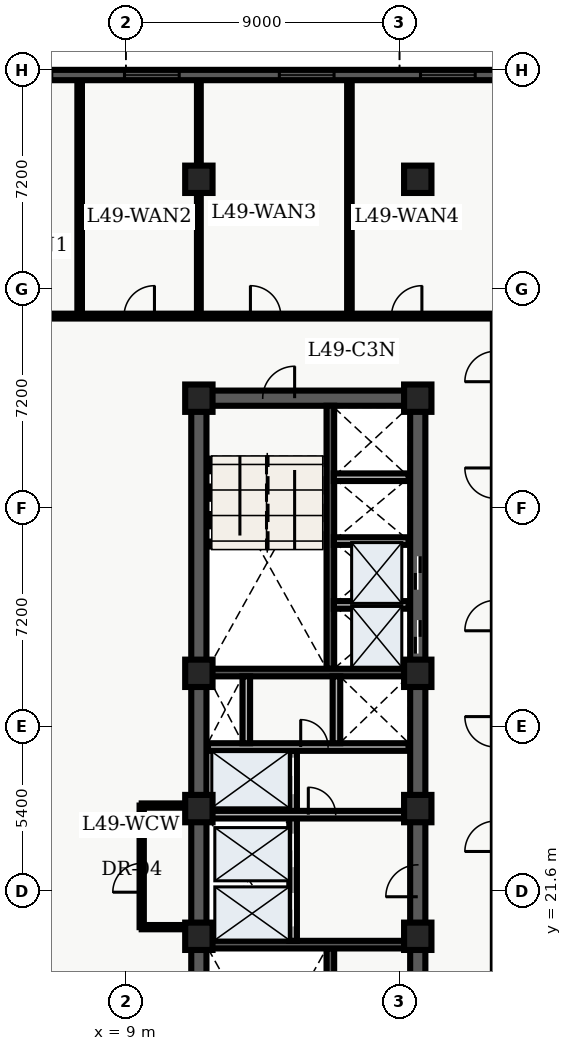
"""IFC4 building model, lengths in metres.
Left out: names, types, materials, properties, quantities, classifications, styles, units other than length and angle.
Written with IfcOpenShell. Run it as: python <this file> out.ifc"""

import sys

from ifc_helpers import new_model, entity, si_unit, converted_unit, direction, frame, origin_with_axes, origin_2d_with_axis, place, context, subcontext, project, spatial, polyline, rectangle, outline, extrude, element, fill, save


model = new_model("IFC4")
c1 = context("Model", 3, precision=1e-05, world=origin_with_axes(), true_north=direction((0.0, 1.0)))
c2 = subcontext(c1, "Body", "Model", "MODEL_VIEW")
j1 = project(units=[si_unit("LENGTHUNIT", "METRE"), converted_unit("PLANEANGLEUNIT", "DEGREE", entity("IfcPlaneAngleMeasure", 0.017), si_unit("PLANEANGLEUNIT", "RADIAN"), dimensions=[0, 0, 0, 0, 0, 0, 0])], contexts=[c1])
p1 = place(None, origin_with_axes())
s1 = spatial("IfcSite", under=j1, at=p1, CompositionType="ELEMENT")
p2 = place(p1, origin_with_axes())
s2 = spatial("IfcBuilding", under=s1, at=p2, CompositionType="ELEMENT")
p3 = place(p2, frame((0.0, 0.0, 200.4), z_axis=(0.0, 0.0, 1.0), x_axis=(1.0, 0.0, 0.0)))
s3 = spatial("IfcBuildingStorey", under=s2, at=p3, CompositionType="ELEMENT", Elevation=200.4)
p4 = place(p3, frame((11.4, 10.8, 0.0), z_axis=(0.0, 0.0, 1.0), x_axis=(0.0, 1.0, 0.0)))
e1 = element("IfcWall", 1, at=p4, inside=s3, PredefinedType="SHEAR", context=c2, shape_type="SweptSolid", body=[
    extrude(outline(polyline([(0.0, -0.25), (27.0, -0.25), (27.0, 0.25), (0.0, 0.25), (0.0, -0.25)])), origin_with_axes(), (0.0, 0.0, 1.0), 3.66),
])
p5 = place(p3, frame((11.4, 37.8, 0.0), z_axis=(0.0, 0.0, 1.0), x_axis=(1.0, 0.0, 0.0)))
e2 = element("IfcWall", 2, at=p5, inside=s3, PredefinedType="SHEAR", context=c2, shape_type="SweptSolid", body=[
    extrude(outline(polyline([(0.0, -0.25), (7.2, -0.25), (7.2, 0.25), (0.0, 0.25), (0.0, -0.25)])), origin_with_axes(), (0.0, 0.0, 1.0), 3.66),
])
p6 = place(p5, frame((2.625, 0.0, 0.0), z_axis=(0.0, 0.0, 1.0), x_axis=(1.0, 0.0, 0.0)))
e3 = element("IfcOpeningElement", 3, at=p6, cuts=e2, PredefinedType="OPENING", context=c2, shape_type="SweptSolid", body=[
    extrude(rectangle(XDim=1.05, YDim=0.52, at=origin_2d_with_axis()), origin_with_axes(), (0.0, 0.0, 1.0), 2.15),
])
p7 = place(p3, frame((18.6, 10.8, 0.0), z_axis=(0.0, 0.0, 1.0), x_axis=(0.0, 1.0, 0.0)))
e4 = element("IfcWall", 4, at=p7, inside=s3, PredefinedType="SHEAR", context=c2, shape_type="SweptSolid", body=[
    extrude(outline(polyline([(0.0, -0.25), (13.5, -0.25), (13.5, 0.25), (0.0, 0.25), (0.0, -0.25)])), origin_with_axes(), (0.0, 0.0, 1.0), 3.66),
])
p8 = place(p7, frame((11.125, 0.0, 0.0), z_axis=(0.0, 0.0, 1.0), x_axis=(1.0, 0.0, 0.0)))
e5 = element("IfcOpeningElement", 5, at=p8, cuts=e4, PredefinedType="OPENING", context=c2, shape_type="SweptSolid", body=[
    extrude(rectangle(XDim=1.05, YDim=0.52, at=origin_2d_with_axis()), origin_with_axes(), (0.0, 0.0, 1.0), 2.15),
])
p9 = place(p7, frame((4.325, 0.0, 0.0), z_axis=(0.0, 0.0, 1.0), x_axis=(1.0, 0.0, 0.0)))
e6 = element("IfcOpeningElement", 6, at=p9, cuts=e4, PredefinedType="OPENING", context=c2, shape_type="SweptSolid", body=[
    extrude(rectangle(XDim=1.05, YDim=0.52, at=origin_2d_with_axis()), origin_with_axes(), (0.0, 0.0, 1.0), 2.15),
])
p10 = place(p3, frame((18.6, 24.3, 0.0), z_axis=(0.0, 0.0, 1.0), x_axis=(0.0, 1.0, 0.0)))
e7 = element("IfcWall", 7, at=p10, inside=s3, PredefinedType="SHEAR", context=c2, shape_type="SweptSolid", body=[
    extrude(outline(polyline([(0.0, -0.25), (13.5, -0.25), (13.5, 0.25), (0.0, 0.25), (0.0, -0.25)])), origin_with_axes(), (0.0, 0.0, 1.0), 3.66),
])
p11 = place(p10, frame((5.65, 0.0, 0.0), z_axis=(0.0, 0.0, 1.0), x_axis=(1.0, 0.0, 0.0)))
e8 = element("IfcOpeningElement", 8, at=p11, cuts=e7, PredefinedType="OPENING", context=c2, shape_type="SweptSolid", body=[
    extrude(rectangle(XDim=1.1, YDim=0.52, at=origin_2d_with_axis()), origin_with_axes(), (0.0, 0.0, 1.0), 2.15),
])
p12 = place(p10, frame((7.75, 0.0, 0.0), z_axis=(0.0, 0.0, 1.0), x_axis=(1.0, 0.0, 0.0)))
e9 = element("IfcOpeningElement", 9, at=p12, cuts=e7, PredefinedType="OPENING", context=c2, shape_type="SweptSolid", body=[
    extrude(rectangle(XDim=1.1, YDim=0.52, at=origin_2d_with_axis()), origin_with_axes(), (0.0, 0.0, 1.0), 2.15),
])
p13 = place(p3, frame((15.725, 11.05, 0.0), z_axis=(0.0, 0.0, 1.0), x_axis=(0.0, 1.0, 0.0)))
e10 = element("IfcWall", 10, at=p13, inside=s3, PredefinedType="SHEAR", context=c2, shape_type="SweptSolid", body=[
    extrude(outline(polyline([(0.0, -0.125), (8.65, -0.125), (8.65, 0.125), (0.0, 0.125), (0.0, -0.125)])), origin_with_axes(), (0.0, 0.0, 1.0), 3.66),
])
p14 = place(p3, frame((11.65, 19.825, 0.0), z_axis=(0.0, 0.0, 1.0), x_axis=(1.0, 0.0, 0.0)))
e11 = element("IfcWall", 11, at=p14, inside=s3, PredefinedType="SHEAR", context=c2, shape_type="SweptSolid", body=[
    extrude(outline(polyline([(0.0, -0.125), (6.7, -0.125), (6.7, 0.125), (0.0, 0.125), (0.0, -0.125)])), origin_with_axes(), (0.0, 0.0, 1.0), 3.66),
])
p15 = place(p3, frame((15.725, 28.9, 0.0), z_axis=(0.0, 0.0, 1.0), x_axis=(0.0, 1.0, 0.0)))
e12 = element("IfcWall", 12, at=p15, inside=s3, PredefinedType="SHEAR", context=c2, shape_type="SweptSolid", body=[
    extrude(outline(polyline([(0.0, -0.125), (8.65, -0.125), (8.65, 0.125), (0.0, 0.125), (0.0, -0.125)])), origin_with_axes(), (0.0, 0.0, 1.0), 3.66),
])
p16 = place(p3, frame((11.65, 28.775, 0.0), z_axis=(0.0, 0.0, 1.0), x_axis=(1.0, 0.0, 0.0)))
e13 = element("IfcWall", 13, at=p16, inside=s3, PredefinedType="SHEAR", context=c2, shape_type="SweptSolid", body=[
    extrude(outline(polyline([(0.0, -0.125), (6.7, -0.125), (6.7, 0.125), (0.0, 0.125), (0.0, -0.125)])), origin_with_axes(), (0.0, 0.0, 1.0), 3.66),
])
p17 = place(p3, frame((14.5, 19.95, 0.0), z_axis=(0.0, 0.0, 1.0), x_axis=(0.0, 1.0, 0.0)))
e14 = element("IfcWall", 14, at=p17, inside=s3, PredefinedType="SOLIDWALL", context=c2, shape_type="SweptSolid", body=[
    extrude(outline(polyline([(0.0, -0.125), (6.25, -0.125), (6.25, 0.125), (0.0, 0.125), (0.0, -0.125)])), origin_with_axes(), (0.0, 0.0, 1.0), 2.7),
])
p18 = place(p17, frame((1.025, 0.0, 0.0), z_axis=(0.0, 0.0, 1.0), x_axis=(1.0, 0.0, 0.0)))
e15 = element("IfcOpeningElement", 15, at=p18, cuts=e14, PredefinedType="OPENING", context=c2, shape_type="SweptSolid", body=[
    extrude(rectangle(XDim=1.1, YDim=0.27, at=origin_2d_with_axis()), origin_with_axes(), (0.0, 0.0, 1.0), 2.15),
])
p19 = place(p17, frame((2.975, 0.0, 0.0), z_axis=(0.0, 0.0, 1.0), x_axis=(1.0, 0.0, 0.0)))
e16 = element("IfcOpeningElement", 16, at=p19, cuts=e14, PredefinedType="OPENING", context=c2, shape_type="SweptSolid", body=[
    extrude(rectangle(XDim=1.1, YDim=0.27, at=origin_2d_with_axis()), origin_with_axes(), (0.0, 0.0, 1.0), 2.15),
])
p20 = place(p17, frame((5.425, 0.0, 0.0), z_axis=(0.0, 0.0, 1.0), x_axis=(1.0, 0.0, 0.0)))
e17 = element("IfcOpeningElement", 17, at=p20, cuts=e14, PredefinedType="OPENING", context=c2, shape_type="SweptSolid", body=[
    extrude(rectangle(XDim=1.2, YDim=0.27, at=origin_2d_with_axis()), origin_with_axes(), (0.0, 0.0, 1.0), 2.15),
])
p21 = place(p3, frame((11.7, 24.1, 0.0), z_axis=(0.0, 0.0, 1.0), x_axis=(1.0, 0.0, 0.0)))
e18 = element("IfcWall", 18, at=p21, inside=s3, PredefinedType="SOLIDWALL", context=c2, shape_type="SweptSolid", body=[
    extrude(outline(polyline([(0.0, -0.125), (6.6, -0.125), (6.6, 0.125), (0.0, 0.125), (0.0, -0.125)])), origin_with_axes(), (0.0, 0.0, 1.0), 2.7),
])
p22 = place(p21, frame((3.75, 0.0, 0.0), z_axis=(0.0, 0.0, 1.0), x_axis=(1.0, 0.0, 0.0)))
e19 = element("IfcOpeningElement", 19, at=p22, cuts=e18, PredefinedType="OPENING", context=c2, shape_type="SweptSolid", body=[
    extrude(rectangle(XDim=0.9, YDim=0.27, at=origin_2d_with_axis()), origin_with_axes(), (0.0, 0.0, 1.0), 2.15),
])
p23 = place(p3, frame((11.7, 26.325, 0.0), z_axis=(0.0, 0.0, 1.0), x_axis=(1.0, 0.0, 0.0)))
e20 = element("IfcWall", 20, at=p23, inside=s3, PredefinedType="SOLIDWALL", context=c2, shape_type="SweptSolid", body=[
    extrude(outline(polyline([(0.0, -0.125), (6.6, -0.125), (6.6, 0.125), (0.0, 0.125), (0.0, -0.125)])), origin_with_axes(), (0.0, 0.0, 1.0), 2.7),
])
p24 = place(p23, frame((3.5, 0.0, 0.0), z_axis=(0.0, 0.0, 1.0), x_axis=(1.0, 0.0, 0.0)))
e21 = element("IfcOpeningElement", 21, at=p24, cuts=e20, PredefinedType="OPENING", context=c2, shape_type="SweptSolid", body=[
    extrude(rectangle(XDim=0.9, YDim=0.27, at=origin_2d_with_axis()), origin_with_axes(), (0.0, 0.0, 1.0), 2.15),
])
for number, where, z_axis, x_axis in (
    (22, (12.96, 26.45, 0.0), (0.0, 0.0, 1.0), (0.0, 1.0, 0.0)),
    (23, (15.925, 26.45, 0.0), (0.0, 0.0, 1.0), (0.0, 1.0, 0.0)),
):
    element("IfcWall", number, at=place(p3, frame(where, z_axis=z_axis, x_axis=x_axis)), inside=s3, PredefinedType="SOLIDWALL", context=c2, shape_type="SweptSolid", body=[
        extrude(outline(polyline([(0.0, -0.125), (2.2, -0.125), (2.2, 0.125), (0.0, 0.125), (0.0, -0.125)])), origin_with_axes(), (0.0, 0.0, 1.0), 2.7),
    ])
for number, where, z_axis, x_axis in (
    (24, (11.4, 20.1, 0.0), (0.0, 0.0, 1.0), (1.0, 0.0, 0.0)),
    (25, (11.4, 24.3, 0.0), (0.0, 0.0, 1.0), (1.0, 0.0, 0.0)),
    (26, (11.4, 28.75, 0.0), (0.0, 0.0, 1.0), (1.0, 0.0, 0.0)),
    (27, (11.4, 37.8, 0.0), (0.0, 0.0, 1.0), (1.0, 0.0, 0.0)),
    (28, (11.4, 45.0, 0.0), (0.0, 0.0, 1.0), (1.0, 0.0, 0.0)),
    (29, (18.6, 20.1, 0.0), (0.0, 0.0, 1.0), (1.0, 0.0, 0.0)),
    (30, (18.6, 24.3, 0.0), (0.0, 0.0, 1.0), (1.0, 0.0, 0.0)),
    (31, (18.6, 28.75, 0.0), (0.0, 0.0, 1.0), (1.0, 0.0, 0.0)),
    (32, (18.6, 37.8, 0.0), (0.0, 0.0, 1.0), (1.0, 0.0, 0.0)),
    (33, (18.6, 45.0, 0.0), (0.0, 0.0, 1.0), (1.0, 0.0, 0.0)),
):
    element("IfcColumn", number, at=place(p3, frame(where, z_axis=z_axis, x_axis=x_axis)), inside=s3, PredefinedType="COLUMN", context=c2, shape_type="SweptSolid", body=[
        extrude(rectangle(XDim=0.9, YDim=0.9, at=origin_2d_with_axis()), origin_with_axes(), (0.0, 0.0, 1.0), 3.9),
    ])
for number, where, z_axis, x_axis in (
    (34, (15.84, 31.0, 0.0), (0.0, 0.0, 1.0), (1.0, 0.0, 0.0)),
    (35, (15.84, 33.1, 0.0), (0.0, 0.0, 1.0), (1.0, 0.0, 0.0)),
    (36, (15.84, 35.2, 0.0), (0.0, 0.0, 1.0), (1.0, 0.0, 0.0)),
):
    element("IfcWall", number, at=place(p3, frame(where, z_axis=z_axis, x_axis=x_axis)), inside=s3, PredefinedType="SOLIDWALL", context=c2, shape_type="SweptSolid", body=[
        extrude(outline(polyline([(0.0, -0.125), (2.46, -0.125), (2.46, 0.125), (0.0, 0.125), (0.0, -0.125)])), origin_with_axes(), (0.0, 0.0, 1.0), 2.7),
    ])
p25 = place(p3, frame((9.52, 20.4, 0.0), z_axis=(0.0, 0.0, 1.0), x_axis=(0.0, 1.0, 0.0)))
e37 = element("IfcWall", 37, at=p25, inside=s3, PredefinedType="PARTITIONING", context=c2, shape_type="SweptSolid", body=[
    extrude(outline(polyline([(0.0, -0.07), (4.0, -0.07), (4.0, 0.07), (0.0, 0.07), (0.0, -0.07)])), origin_with_axes(), (0.0, 0.0, 1.0), 2.7),
])
p26 = place(p25, frame((1.625, 0.0, 0.0), z_axis=(0.0, 0.0, 1.0), x_axis=(1.0, 0.0, 0.0)))
e38 = element("IfcOpeningElement", 38, at=p26, cuts=e37, PredefinedType="OPENING", context=c2, shape_type="SweptSolid", body=[
    extrude(rectangle(XDim=0.95, YDim=0.16, at=origin_2d_with_axis()), origin_with_axes(), (0.0, 0.0, 1.0), 2.15),
])
for number, where, z_axis, x_axis in (
    (39, (9.52, 20.4, 0.0), (0.0, 0.0, 1.0), (1.0, 0.0, 0.0)),
    (40, (9.52, 24.4, 0.0), (0.0, 0.0, 1.0), (1.0, 0.0, 0.0)),
):
    element("IfcWall", number, at=place(p3, frame(where, z_axis=z_axis, x_axis=x_axis)), inside=s3, PredefinedType="PARTITIONING", context=c2, shape_type="SweptSolid", body=[
        extrude(outline(polyline([(0.0, -0.07), (1.58, -0.07), (1.58, 0.07), (0.0, 0.07), (0.0, -0.07)])), origin_with_axes(), (0.0, 0.0, 1.0), 2.7),
    ])
p27 = place(p3, frame((2.6, 40.5, 0.0), z_axis=(0.0, 0.0, 1.0), x_axis=(1.0, 0.0, 0.0)))
e41 = element("IfcWall", 41, at=p27, inside=s3, PredefinedType="PARTITIONING", context=c2, shape_type="SweptSolid", body=[
    extrude(outline(polyline([(0.0, -0.08), (26.177, -0.08), (26.177, 0.08), (0.0, 0.08), (0.0, -0.08)])), origin_with_axes(), (0.0, 0.0, 1.0), 2.7),
])
p28 = place(p27, frame((1.554, 0.0, 0.0), z_axis=(0.0, 0.0, 1.0), x_axis=(1.0, 0.0, 0.0)))
e42 = element("IfcOpeningElement", 42, at=p28, cuts=e41, PredefinedType="OPENING", context=c2, shape_type="SweptSolid", body=[
    extrude(rectangle(XDim=1.0, YDim=0.18, at=origin_2d_with_axis()), origin_with_axes(), (0.0, 0.0, 1.0), 2.15),
])
p29 = place(p27, frame((6.84, 0.0, 0.0), z_axis=(0.0, 0.0, 1.0), x_axis=(1.0, 0.0, 0.0)))
e43 = element("IfcOpeningElement", 43, at=p29, cuts=e41, PredefinedType="OPENING", context=c2, shape_type="SweptSolid", body=[
    extrude(rectangle(XDim=1.0, YDim=0.18, at=origin_2d_with_axis()), origin_with_axes(), (0.0, 0.0, 1.0), 2.15),
])
p30 = place(p27, frame((10.996, 0.0, 0.0), z_axis=(0.0, 0.0, 1.0), x_axis=(1.0, 0.0, 0.0)))
e44 = element("IfcOpeningElement", 44, at=p30, cuts=e41, PredefinedType="OPENING", context=c2, shape_type="SweptSolid", body=[
    extrude(rectangle(XDim=1.0, YDim=0.18, at=origin_2d_with_axis()), origin_with_axes(), (0.0, 0.0, 1.0), 2.15),
])
p31 = place(p27, frame((15.636, 0.0, 0.0), z_axis=(0.0, 0.0, 1.0), x_axis=(1.0, 0.0, 0.0)))
e45 = element("IfcOpeningElement", 45, at=p31, cuts=e41, PredefinedType="OPENING", context=c2, shape_type="SweptSolid", body=[
    extrude(rectangle(XDim=1.0, YDim=0.18, at=origin_2d_with_axis()), origin_with_axes(), (0.0, 0.0, 1.0), 2.15),
])
p32 = place(p3, frame((7.479, 40.6, 0.0), z_axis=(0.0, 0.0, 1.0), x_axis=(0.0, 1.0, 0.0)))
e46 = element("IfcWall", 46, at=p32, inside=s3, PredefinedType="PARTITIONING", context=c2, shape_type="SweptSolid", body=[
    extrude(outline(polyline([(0.0, -0.075), (7.665, -0.075), (7.665, 0.075), (0.0, 0.075), (0.0, -0.075)])), origin_with_axes(), (0.0, 0.0, 1.0), 2.7),
])
p33 = place(p3, frame((11.4, 40.6, 0.0), z_axis=(0.0, 0.0, 1.0), x_axis=(0.0, 1.0, 0.0)))
e47 = element("IfcWall", 47, at=p33, inside=s3, PredefinedType="PARTITIONING", context=c2, shape_type="SweptSolid", body=[
    extrude(outline(polyline([(0.0, -0.062), (7.665, -0.062), (7.665, 0.062), (0.0, 0.062), (0.0, -0.062)])), origin_with_axes(), (0.0, 0.0, 1.0), 2.7),
])
p34 = place(p3, frame((16.352, 40.6, 0.0), z_axis=(0.0, 0.0, 1.0), x_axis=(0.0, 1.0, 0.0)))
e48 = element("IfcWall", 48, at=p34, inside=s3, PredefinedType="PARTITIONING", context=c2, shape_type="SweptSolid", body=[
    extrude(outline(polyline([(0.0, -0.075), (7.665, -0.075), (7.665, 0.075), (0.0, 0.075), (0.0, -0.075)])), origin_with_axes(), (0.0, 0.0, 1.0), 2.7),
])
p35 = place(p3, frame((2.74, 48.43, 0.0), z_axis=(0.0, 0.0, 1.0), x_axis=(1.0, 0.0, 0.0)))
e49 = element("IfcWall", 49, at=p35, inside=s3, PredefinedType="SOLIDWALL", context=c2, shape_type="SweptSolid", body=[
    extrude(outline(polyline([(0.0, -0.17), (19.772, -0.17), (19.772, 0.17), (0.0, 0.17), (0.0, -0.17)])), origin_with_axes(), (0.0, 0.0, 1.0), 3.66),
])
p36 = place(p35, frame((2.922, 0.0, 0.45), z_axis=(0.0, 0.0, 1.0), x_axis=(1.0, 0.0, 0.0)))
e50 = element("IfcOpeningElement", 50, at=p36, cuts=e49, PredefinedType="OPENING", context=c2, shape_type="SweptSolid", body=[
    extrude(rectangle(XDim=1.8, YDim=0.36, at=origin_2d_with_axis()), origin_with_axes(), (0.0, 0.0, 1.0), 2.1),
])
p37 = place(p35, frame((7.114, 0.0, 0.45), z_axis=(0.0, 0.0, 1.0), x_axis=(1.0, 0.0, 0.0)))
e51 = element("IfcOpeningElement", 51, at=p37, cuts=e49, PredefinedType="OPENING", context=c2, shape_type="SweptSolid", body=[
    extrude(rectangle(XDim=1.8, YDim=0.36, at=origin_2d_with_axis()), origin_with_axes(), (0.0, 0.0, 1.0), 2.1),
])
p38 = place(p35, frame((12.207, 0.0, 0.45), z_axis=(0.0, 0.0, 1.0), x_axis=(1.0, 0.0, 0.0)))
e52 = element("IfcOpeningElement", 52, at=p38, cuts=e49, PredefinedType="OPENING", context=c2, shape_type="SweptSolid", body=[
    extrude(rectangle(XDim=1.8, YDim=0.36, at=origin_2d_with_axis()), origin_with_axes(), (0.0, 0.0, 1.0), 2.1),
])
p39 = place(p35, frame((16.85, 0.0, 0.45), z_axis=(0.0, 0.0, 1.0), x_axis=(1.0, 0.0, 0.0)))
e53 = element("IfcOpeningElement", 53, at=p39, cuts=e49, PredefinedType="OPENING", context=c2, shape_type="SweptSolid", body=[
    extrude(rectangle(XDim=1.8, YDim=0.36, at=origin_2d_with_axis()), origin_with_axes(), (0.0, 0.0, 1.0), 2.1),
])
p40 = place(p10, frame((5.65, 0.0, 0.0), z_axis=(0.0, 0.0, 1.0), x_axis=(1.0, 0.0, 0.0)))
e54 = element("IfcDoor", 54, at=p40, inside=s3, OperationType="SLIDING_TO_LEFT", PredefinedType="DOOR", context=c2, shape_type="SweptSolid", body=[
    extrude(rectangle(XDim=1.1, YDim=0.09, at=origin_2d_with_axis()), origin_with_axes(), (0.0, 0.0, 1.0), 2.15),
])
fill(e8, e54)
p41 = place(p10, frame((7.75, 0.0, 0.0), z_axis=(0.0, 0.0, 1.0), x_axis=(1.0, 0.0, 0.0)))
e55 = element("IfcDoor", 55, at=p41, inside=s3, OperationType="SLIDING_TO_RIGHT", PredefinedType="DOOR", context=c2, shape_type="SweptSolid", body=[
    extrude(rectangle(XDim=1.1, YDim=0.09, at=origin_2d_with_axis()), origin_with_axes(), (0.0, 0.0, 1.0), 2.15),
])
fill(e9, e55)
p42 = place(p17, frame((1.025, 0.0, 0.0), z_axis=(0.0, 0.0, 1.0), x_axis=(1.0, 0.0, 0.0)))
e56 = element("IfcDoor", 56, at=p42, inside=s3, OperationType="SLIDING_TO_LEFT", PredefinedType="DOOR", context=c2, shape_type="SweptSolid", body=[
    extrude(rectangle(XDim=1.1, YDim=0.09, at=origin_2d_with_axis()), origin_with_axes(), (0.0, 0.0, 1.0), 2.15),
])
fill(e15, e56)
p43 = place(p17, frame((2.975, 0.0, 0.0), z_axis=(0.0, 0.0, 1.0), x_axis=(1.0, 0.0, 0.0)))
e57 = element("IfcDoor", 57, at=p43, inside=s3, OperationType="SLIDING_TO_RIGHT", PredefinedType="DOOR", context=c2, shape_type="SweptSolid", body=[
    extrude(rectangle(XDim=1.1, YDim=0.09, at=origin_2d_with_axis()), origin_with_axes(), (0.0, 0.0, 1.0), 2.15),
])
fill(e16, e57)
p44 = place(p17, frame((5.425, 0.0, 0.0), z_axis=(0.0, 0.0, 1.0), x_axis=(1.0, 0.0, 0.0)))
e58 = element("IfcDoor", 58, at=p44, inside=s3, OperationType="DOUBLE_DOOR_SLIDING", PredefinedType="DOOR", context=c2, shape_type="SweptSolid", body=[
    extrude(rectangle(XDim=1.2, YDim=0.09, at=origin_2d_with_axis()), origin_with_axes(), (0.0, 0.0, 1.0), 2.15),
])
fill(e17, e58)
p45 = place(p5, frame((2.625, 0.0, 0.0), z_axis=(0.0, 0.0, 1.0), x_axis=(1.0, 0.0, 0.0)))
e59 = element("IfcDoor", 59, at=p45, inside=s3, OperationType="SINGLE_SWING_RIGHT", PredefinedType="DOOR", context=c2, shape_type="SweptSolid", body=[
    extrude(rectangle(XDim=1.05, YDim=0.09, at=origin_2d_with_axis()), origin_with_axes(), (0.0, 0.0, 1.0), 2.15),
])
fill(e3, e59)
p46 = place(p7, frame((11.125, 0.0, 0.0), z_axis=(0.0, 0.0, 1.0), x_axis=(1.0, 0.0, 0.0)))
e60 = element("IfcDoor", 60, at=p46, inside=s3, OperationType="SINGLE_SWING_LEFT", PredefinedType="DOOR", context=c2, shape_type="SweptSolid", body=[
    extrude(rectangle(XDim=1.05, YDim=0.09, at=origin_2d_with_axis()), origin_with_axes(), (0.0, 0.0, 1.0), 2.15),
])
fill(e5, e60)
p47 = place(p21, frame((3.75, 0.0, 0.0), z_axis=(0.0, 0.0, 1.0), x_axis=(1.0, 0.0, 0.0)))
e61 = element("IfcDoor", 61, at=p47, inside=s3, OperationType="SINGLE_SWING_LEFT", PredefinedType="DOOR", context=c2, shape_type="SweptSolid", body=[
    extrude(rectangle(XDim=0.9, YDim=0.09, at=origin_2d_with_axis()), origin_with_axes(), (0.0, 0.0, 1.0), 2.15),
])
fill(e19, e61)
p48 = place(p23, frame((3.5, 0.0, 0.0), z_axis=(0.0, 0.0, 1.0), x_axis=(1.0, 0.0, 0.0)))
e62 = element("IfcDoor", 62, at=p48, inside=s3, OperationType="SINGLE_SWING_LEFT", PredefinedType="DOOR", context=c2, shape_type="SweptSolid", body=[
    extrude(rectangle(XDim=0.9, YDim=0.09, at=origin_2d_with_axis()), origin_with_axes(), (0.0, 0.0, 1.0), 2.15),
])
fill(e21, e62)
p49 = place(p25, frame((1.625, 0.0, 0.0), z_axis=(0.0, 0.0, 1.0), x_axis=(1.0, 0.0, 0.0)))
e63 = element("IfcDoor", 63, at=p49, inside=s3, OperationType="SINGLE_SWING_LEFT", PredefinedType="DOOR", context=c2, shape_type="SweptSolid", body=[
    extrude(rectangle(XDim=0.95, YDim=0.084, at=origin_2d_with_axis()), origin_with_axes(), (0.0, 0.0, 1.0), 2.15),
])
fill(e38, e63)
p50 = place(p27, frame((6.84, 0.0, 0.0), z_axis=(0.0, 0.0, 1.0), x_axis=(1.0, 0.0, 0.0)))
e64 = element("IfcDoor", 64, at=p50, inside=s3, OperationType="SINGLE_SWING_RIGHT", PredefinedType="DOOR", context=c2, shape_type="SweptSolid", body=[
    extrude(rectangle(XDim=1.0, YDim=0.09, at=origin_2d_with_axis()), origin_with_axes(), (0.0, 0.0, 1.0), 2.15),
])
fill(e43, e64)
p51 = place(p27, frame((10.996, 0.0, 0.0), z_axis=(0.0, 0.0, 1.0), x_axis=(1.0, 0.0, 0.0)))
e65 = element("IfcDoor", 65, at=p51, inside=s3, OperationType="SINGLE_SWING_LEFT", PredefinedType="DOOR", context=c2, shape_type="SweptSolid", body=[
    extrude(rectangle(XDim=1.0, YDim=0.09, at=origin_2d_with_axis()), origin_with_axes(), (0.0, 0.0, 1.0), 2.15),
])
fill(e44, e65)
p52 = place(p27, frame((15.636, 0.0, 0.0), z_axis=(0.0, 0.0, 1.0), x_axis=(1.0, 0.0, 0.0)))
e66 = element("IfcDoor", 66, at=p52, inside=s3, OperationType="SINGLE_SWING_RIGHT", PredefinedType="DOOR", context=c2, shape_type="SweptSolid", body=[
    extrude(rectangle(XDim=1.0, YDim=0.09, at=origin_2d_with_axis()), origin_with_axes(), (0.0, 0.0, 1.0), 2.15),
])
fill(e45, e66)
p53 = place(p35, frame((7.114, 0.0, 0.45), z_axis=(0.0, 0.0, 1.0), x_axis=(1.0, 0.0, 0.0)))
e67 = element("IfcWindow", 67, at=p53, inside=s3, PredefinedType="WINDOW", context=c2, shape_type="SweptSolid", body=[
    extrude(rectangle(XDim=1.8, YDim=0.09, at=origin_2d_with_axis()), origin_with_axes(), (0.0, 0.0, 1.0), 2.1),
])
fill(e51, e67)
p54 = place(p35, frame((12.207, 0.0, 0.45), z_axis=(0.0, 0.0, 1.0), x_axis=(1.0, 0.0, 0.0)))
e68 = element("IfcWindow", 68, at=p54, inside=s3, PredefinedType="WINDOW", context=c2, shape_type="SweptSolid", body=[
    extrude(rectangle(XDim=1.8, YDim=0.09, at=origin_2d_with_axis()), origin_with_axes(), (0.0, 0.0, 1.0), 2.1),
])
fill(e52, e68)
p55 = place(p35, frame((16.85, 0.0, 0.45), z_axis=(0.0, 0.0, 1.0), x_axis=(1.0, 0.0, 0.0)))
e69 = element("IfcWindow", 69, at=p55, inside=s3, PredefinedType="WINDOW", context=c2, shape_type="SweptSolid", body=[
    extrude(rectangle(XDim=1.8, YDim=0.09, at=origin_2d_with_axis()), origin_with_axes(), (0.0, 0.0, 1.0), 2.1),
])
fill(e53, e69)
save(model, sys.argv[1])
